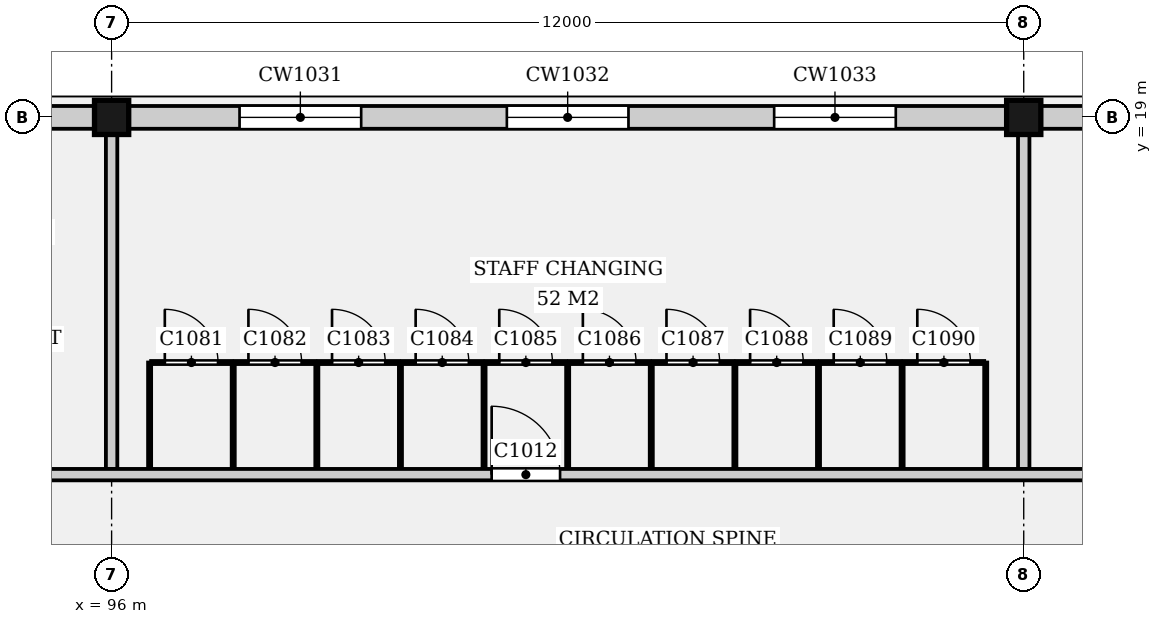
"""IFC4 building model, lengths in metres.
Left out: names, types, materials, properties, quantities, classifications, styles, units other than length and angle.
Written with IfcOpenShell. Run it as: python <this file> out.ifc"""

import sys

from ifc_helpers import new_model, si_unit, direction, frame, frame_2d, origin, origin_2d, place, context, subcontext, project, spatial, rectangle, extrude, element, fill, save


model = new_model("IFC4")
c1 = context("Model", 3, precision=1e-05, world=origin(), true_north=direction((0.0, 1.0)))
c2 = subcontext(c1, "Body", "Model", "MODEL_VIEW")
j1 = project(units=[si_unit("LENGTHUNIT", "METRE"), si_unit("PLANEANGLEUNIT", "RADIAN")], contexts=[c1])
p1 = place(None, origin())
s1 = spatial("IfcSite", under=j1, at=p1, CompositionType="ELEMENT")
p2 = place(p1, origin())
s2 = spatial("IfcBuilding", under=s1, at=p2, CompositionType="ELEMENT")
p3 = place(p2, frame((0.0, 0.0, 5.0)))
s3 = spatial("IfcBuildingStorey", under=s2, at=p3, CompositionType="ELEMENT", Elevation=5.0)
for number, where, z_axis, x_axis in (
    (1, (96.0, 19.0, 0.0), (0.0, 0.0, 1.0), (1.0, 0.0, 0.0)),
    (2, (108.0, 19.0, 0.0), (0.0, 0.0, 1.0), (1.0, 0.0, 0.0)),
):
    element("IfcColumn", number, at=place(p3, frame(where, z_axis=z_axis, x_axis=x_axis)), inside=s3, PredefinedType="COLUMN", context=c2, shape_type="SweptSolid", body=[
        extrude(rectangle(XDim=0.45, YDim=0.45, at=origin_2d()), origin(), (0.0, 0.0, 1.0), 4.4),
    ])
p4 = place(p3, frame((84.225, 19.0, 0.0), z_axis=(0.0, 0.0, 1.0), x_axis=(1.0, 0.0, 0.0)))
e3 = element("IfcWall", 3, at=p4, inside=s3, PredefinedType="ELEMENTEDWALL", context=c2, shape_type="SweptSolid", body=[
    extrude(rectangle(XDim=11.55, YDim=0.3, at=frame_2d((5.775, 0.0))), origin(), (0.0, 0.0, 1.0), 3.98),
])
p5 = place(p4, frame((1.458, 0.0, 1.4)))
e4 = element("IfcOpeningElement", 4, at=p5, cuts=e3, PredefinedType="OPENING", context=c2, shape_type="SweptSolid", body=[
    extrude(rectangle(XDim=1.6, YDim=1.2, at=frame_2d((0.8, 0.6))), frame((0.0, 0.16, 0.0), z_axis=(0.0, -1.0, 0.0), x_axis=(1.0, 0.0, 0.0)), (0.0, 0.0, 1.0), 0.32),
])
p6 = place(p4, frame((4.975, 0.0, 1.4)))
e5 = element("IfcOpeningElement", 5, at=p6, cuts=e3, PredefinedType="OPENING", context=c2, shape_type="SweptSolid", body=[
    extrude(rectangle(XDim=1.6, YDim=1.2, at=frame_2d((0.8, 0.6))), frame((0.0, 0.16, 0.0), z_axis=(0.0, -1.0, 0.0), x_axis=(1.0, 0.0, 0.0)), (0.0, 0.0, 1.0), 0.32),
])
p7 = place(p4, frame((8.492, 0.0, 1.4)))
e6 = element("IfcOpeningElement", 6, at=p7, cuts=e3, PredefinedType="OPENING", context=c2, shape_type="SweptSolid", body=[
    extrude(rectangle(XDim=1.6, YDim=1.2, at=frame_2d((0.8, 0.6))), frame((0.0, 0.16, 0.0), z_axis=(0.0, -1.0, 0.0), x_axis=(1.0, 0.0, 0.0)), (0.0, 0.0, 1.0), 0.32),
])
p8 = place(p3, frame((96.225, 19.0, 0.0), z_axis=(0.0, 0.0, 1.0), x_axis=(1.0, 0.0, 0.0)))
e7 = element("IfcWall", 7, at=p8, inside=s3, PredefinedType="ELEMENTEDWALL", context=c2, shape_type="SweptSolid", body=[
    extrude(rectangle(XDim=11.55, YDim=0.3, at=frame_2d((5.775, 0.0))), origin(), (0.0, 0.0, 1.0), 3.98),
])
p9 = place(p8, frame((1.458, 0.0, 1.4)))
e8 = element("IfcOpeningElement", 8, at=p9, cuts=e7, PredefinedType="OPENING", context=c2, shape_type="SweptSolid", body=[
    extrude(rectangle(XDim=1.6, YDim=1.2, at=frame_2d((0.8, 0.6))), frame((0.0, 0.16, 0.0), z_axis=(0.0, -1.0, 0.0), x_axis=(1.0, 0.0, 0.0)), (0.0, 0.0, 1.0), 0.32),
])
p10 = place(p8, frame((4.975, 0.0, 1.4)))
e9 = element("IfcOpeningElement", 9, at=p10, cuts=e7, PredefinedType="OPENING", context=c2, shape_type="SweptSolid", body=[
    extrude(rectangle(XDim=1.6, YDim=1.2, at=frame_2d((0.8, 0.6))), frame((0.0, 0.16, 0.0), z_axis=(0.0, -1.0, 0.0), x_axis=(1.0, 0.0, 0.0)), (0.0, 0.0, 1.0), 0.32),
])
p11 = place(p8, frame((8.492, 0.0, 1.4)))
e10 = element("IfcOpeningElement", 10, at=p11, cuts=e7, PredefinedType="OPENING", context=c2, shape_type="SweptSolid", body=[
    extrude(rectangle(XDim=1.6, YDim=1.2, at=frame_2d((0.8, 0.6))), frame((0.0, 0.16, 0.0), z_axis=(0.0, -1.0, 0.0), x_axis=(1.0, 0.0, 0.0)), (0.0, 0.0, 1.0), 0.32),
])
p12 = place(p3, frame((108.225, 19.0, 0.0), z_axis=(0.0, 0.0, 1.0), x_axis=(1.0, 0.0, 0.0)))
e11 = element("IfcWall", 11, at=p12, inside=s3, PredefinedType="ELEMENTEDWALL", context=c2, shape_type="SweptSolid", body=[
    extrude(rectangle(XDim=11.55, YDim=0.3, at=frame_2d((5.775, 0.0))), origin(), (0.0, 0.0, 1.0), 3.98),
])
p13 = place(p12, frame((1.458, 0.0, 1.4)))
e12 = element("IfcOpeningElement", 12, at=p13, cuts=e11, PredefinedType="OPENING", context=c2, shape_type="SweptSolid", body=[
    extrude(rectangle(XDim=1.6, YDim=1.2, at=frame_2d((0.8, 0.6))), frame((0.0, 0.16, 0.0), z_axis=(0.0, -1.0, 0.0), x_axis=(1.0, 0.0, 0.0)), (0.0, 0.0, 1.0), 0.32),
])
p14 = place(p12, frame((4.975, 0.0, 1.4)))
e13 = element("IfcOpeningElement", 13, at=p14, cuts=e11, PredefinedType="OPENING", context=c2, shape_type="SweptSolid", body=[
    extrude(rectangle(XDim=1.6, YDim=1.2, at=frame_2d((0.8, 0.6))), frame((0.0, 0.16, 0.0), z_axis=(0.0, -1.0, 0.0), x_axis=(1.0, 0.0, 0.0)), (0.0, 0.0, 1.0), 0.32),
])
p15 = place(p12, frame((8.492, 0.0, 1.4)))
e14 = element("IfcOpeningElement", 14, at=p15, cuts=e11, PredefinedType="OPENING", context=c2, shape_type="SweptSolid", body=[
    extrude(rectangle(XDim=1.6, YDim=1.2, at=frame_2d((0.8, 0.6))), frame((0.0, 0.16, 0.0), z_axis=(0.0, -1.0, 0.0), x_axis=(1.0, 0.0, 0.0)), (0.0, 0.0, 1.0), 0.32),
])
p16 = place(p3, frame((55.3, 14.3, 0.0), z_axis=(0.0, 0.0, 1.0), x_axis=(1.0, 0.0, 0.0)))
e15 = element("IfcWall", 15, at=p16, inside=s3, PredefinedType="PARTITIONING", context=c2, shape_type="SweptSolid", body=[
    extrude(rectangle(XDim=93.4, YDim=0.15, at=frame_2d((46.7, 0.0))), origin(), (0.0, 0.0, 1.0), 3.98),
])
p17 = place(p16, frame((15.8, 0.0, 0.0)))
e16 = element("IfcOpeningElement", 16, at=p17, cuts=e15, PredefinedType="OPENING", context=c2, shape_type="SweptSolid", body=[
    extrude(rectangle(XDim=1.8, YDim=2.4, at=frame_2d((0.9, 1.2))), frame((0.0, 0.085, 0.0), z_axis=(0.0, -1.0, 0.0), x_axis=(1.0, 0.0, 0.0)), (0.0, 0.0, 1.0), 0.17),
])
p18 = place(p16, frame((32.2, 0.0, 0.0)))
e17 = element("IfcOpeningElement", 17, at=p18, cuts=e15, PredefinedType="OPENING", context=c2, shape_type="SweptSolid", body=[
    extrude(rectangle(XDim=1.0, YDim=2.1, at=frame_2d((0.5, 1.05))), frame((0.0, 0.085, 0.0), z_axis=(0.0, -1.0, 0.0), x_axis=(1.0, 0.0, 0.0)), (0.0, 0.0, 1.0), 0.17),
])
p19 = place(p16, frame((38.2, 0.0, 0.0)))
e18 = element("IfcOpeningElement", 18, at=p19, cuts=e15, PredefinedType="OPENING", context=c2, shape_type="SweptSolid", body=[
    extrude(rectangle(XDim=1.0, YDim=2.1, at=frame_2d((0.5, 1.05))), frame((0.0, 0.085, 0.0), z_axis=(0.0, -1.0, 0.0), x_axis=(1.0, 0.0, 0.0)), (0.0, 0.0, 1.0), 0.17),
])
p20 = place(p16, frame((45.7, 0.0, 0.0)))
e19 = element("IfcOpeningElement", 19, at=p20, cuts=e15, PredefinedType="OPENING", context=c2, shape_type="SweptSolid", body=[
    extrude(rectangle(XDim=0.9, YDim=2.1, at=frame_2d((0.45, 1.05))), frame((0.0, 0.085, 0.0), z_axis=(0.0, -1.0, 0.0), x_axis=(1.0, 0.0, 0.0)), (0.0, 0.0, 1.0), 0.17),
])
p21 = place(p16, frame((58.2, 0.0, 0.0)))
e20 = element("IfcOpeningElement", 20, at=p21, cuts=e15, PredefinedType="OPENING", context=c2, shape_type="SweptSolid", body=[
    extrude(rectangle(XDim=1.0, YDim=2.1, at=frame_2d((0.5, 1.05))), frame((0.0, 0.085, 0.0), z_axis=(0.0, -1.0, 0.0), x_axis=(1.0, 0.0, 0.0)), (0.0, 0.0, 1.0), 0.17),
])
p22 = place(p16, frame((70.2, 0.0, 0.0)))
e21 = element("IfcOpeningElement", 21, at=p22, cuts=e15, PredefinedType="OPENING", context=c2, shape_type="SweptSolid", body=[
    extrude(rectangle(XDim=1.0, YDim=2.1, at=frame_2d((0.5, 1.05))), frame((0.0, 0.085, 0.0), z_axis=(0.0, -1.0, 0.0), x_axis=(1.0, 0.0, 0.0)), (0.0, 0.0, 1.0), 0.17),
])
p23 = place(p16, frame((81.68, 0.0, 0.0)))
e22 = element("IfcOpeningElement", 22, at=p23, cuts=e15, PredefinedType="OPENING", context=c2, shape_type="SweptSolid", body=[
    extrude(rectangle(XDim=0.9, YDim=2.1, at=frame_2d((0.45, 1.05))), frame((0.0, 0.085, 0.0), z_axis=(0.0, -1.0, 0.0), x_axis=(1.0, 0.0, 0.0)), (0.0, 0.0, 1.0), 0.17),
])
for number, where, z_axis, x_axis in (
    (23, (96.0, 14.375, 0.0), (0.0, 0.0, 1.0), (0.0, 1.0, 0.0)),
    (24, (108.0, 14.375, 0.0), (0.0, 0.0, 1.0), (0.0, 1.0, 0.0)),
):
    element("IfcWall", number, at=place(p3, frame(where, z_axis=z_axis, x_axis=x_axis)), inside=s3, PredefinedType="PARTITIONING", context=c2, shape_type="SweptSolid", body=[
        extrude(rectangle(XDim=4.4, YDim=0.15, at=frame_2d((2.2, 0.0))), origin(), (0.0, 0.0, 1.0), 3.98),
    ])
for number, where, z_axis, x_axis in (
    (25, (96.5, 14.375, 0.0), (0.0, 0.0, 1.0), (0.0, 1.0, 0.0)),
    (26, (97.6, 14.375, 0.0), (0.0, 0.0, 1.0), (0.0, 1.0, 0.0)),
    (27, (98.7, 14.375, 0.0), (0.0, 0.0, 1.0), (0.0, 1.0, 0.0)),
    (28, (99.8, 14.375, 0.0), (0.0, 0.0, 1.0), (0.0, 1.0, 0.0)),
    (29, (100.9, 14.375, 0.0), (0.0, 0.0, 1.0), (0.0, 1.0, 0.0)),
    (30, (102.0, 14.375, 0.0), (0.0, 0.0, 1.0), (0.0, 1.0, 0.0)),
    (31, (103.1, 14.375, 0.0), (0.0, 0.0, 1.0), (0.0, 1.0, 0.0)),
    (32, (104.2, 14.375, 0.0), (0.0, 0.0, 1.0), (0.0, 1.0, 0.0)),
    (33, (105.3, 14.375, 0.0), (0.0, 0.0, 1.0), (0.0, 1.0, 0.0)),
    (34, (106.4, 14.375, 0.0), (0.0, 0.0, 1.0), (0.0, 1.0, 0.0)),
    (35, (107.5, 14.375, 0.0), (0.0, 0.0, 1.0), (0.0, 1.0, 0.0)),
):
    element("IfcWall", number, at=place(p3, frame(where, z_axis=z_axis, x_axis=x_axis)), inside=s3, PredefinedType="PARTITIONING", context=c2, shape_type="SweptSolid", body=[
        extrude(rectangle(XDim=1.4, YDim=0.04, at=frame_2d((0.7, 0.0))), origin(), (0.0, 0.0, 1.0), 2.4),
    ])
p24 = place(p3, frame((96.52, 15.775, 0.0), z_axis=(0.0, 0.0, 1.0), x_axis=(1.0, 0.0, 0.0)))
e36 = element("IfcWall", 36, at=p24, inside=s3, PredefinedType="PARTITIONING", context=c2, shape_type="SweptSolid", body=[
    extrude(rectangle(XDim=1.06, YDim=0.04, at=frame_2d((0.53, 0.0))), origin(), (0.0, 0.0, 1.0), 2.4),
])
p25 = place(p24, frame((0.18, 0.0, 0.0)))
e37 = element("IfcOpeningElement", 37, at=p25, cuts=e36, PredefinedType="OPENING", context=c2, shape_type="SweptSolid", body=[
    extrude(rectangle(XDim=0.7, YDim=2.0, at=frame_2d((0.35, 1.0))), frame((0.0, 0.03, 0.0), z_axis=(0.0, -1.0, 0.0), x_axis=(1.0, 0.0, 0.0)), (0.0, 0.0, 1.0), 0.06),
])
p26 = place(p3, frame((97.62, 15.775, 0.0), z_axis=(0.0, 0.0, 1.0), x_axis=(1.0, 0.0, 0.0)))
e38 = element("IfcWall", 38, at=p26, inside=s3, PredefinedType="PARTITIONING", context=c2, shape_type="SweptSolid", body=[
    extrude(rectangle(XDim=1.06, YDim=0.04, at=frame_2d((0.53, 0.0))), origin(), (0.0, 0.0, 1.0), 2.4),
])
p27 = place(p26, frame((0.18, 0.0, 0.0)))
e39 = element("IfcOpeningElement", 39, at=p27, cuts=e38, PredefinedType="OPENING", context=c2, shape_type="SweptSolid", body=[
    extrude(rectangle(XDim=0.7, YDim=2.0, at=frame_2d((0.35, 1.0))), frame((0.0, 0.03, 0.0), z_axis=(0.0, -1.0, 0.0), x_axis=(1.0, 0.0, 0.0)), (0.0, 0.0, 1.0), 0.06),
])
p28 = place(p3, frame((98.72, 15.775, 0.0), z_axis=(0.0, 0.0, 1.0), x_axis=(1.0, 0.0, 0.0)))
e40 = element("IfcWall", 40, at=p28, inside=s3, PredefinedType="PARTITIONING", context=c2, shape_type="SweptSolid", body=[
    extrude(rectangle(XDim=1.06, YDim=0.04, at=frame_2d((0.53, 0.0))), origin(), (0.0, 0.0, 1.0), 2.4),
])
p29 = place(p28, frame((0.18, 0.0, 0.0)))
e41 = element("IfcOpeningElement", 41, at=p29, cuts=e40, PredefinedType="OPENING", context=c2, shape_type="SweptSolid", body=[
    extrude(rectangle(XDim=0.7, YDim=2.0, at=frame_2d((0.35, 1.0))), frame((0.0, 0.03, 0.0), z_axis=(0.0, -1.0, 0.0), x_axis=(1.0, 0.0, 0.0)), (0.0, 0.0, 1.0), 0.06),
])
p30 = place(p3, frame((99.82, 15.775, 0.0), z_axis=(0.0, 0.0, 1.0), x_axis=(1.0, 0.0, 0.0)))
e42 = element("IfcWall", 42, at=p30, inside=s3, PredefinedType="PARTITIONING", context=c2, shape_type="SweptSolid", body=[
    extrude(rectangle(XDim=1.06, YDim=0.04, at=frame_2d((0.53, 0.0))), origin(), (0.0, 0.0, 1.0), 2.4),
])
p31 = place(p30, frame((0.18, 0.0, 0.0)))
e43 = element("IfcOpeningElement", 43, at=p31, cuts=e42, PredefinedType="OPENING", context=c2, shape_type="SweptSolid", body=[
    extrude(rectangle(XDim=0.7, YDim=2.0, at=frame_2d((0.35, 1.0))), frame((0.0, 0.03, 0.0), z_axis=(0.0, -1.0, 0.0), x_axis=(1.0, 0.0, 0.0)), (0.0, 0.0, 1.0), 0.06),
])
p32 = place(p3, frame((100.92, 15.775, 0.0), z_axis=(0.0, 0.0, 1.0), x_axis=(1.0, 0.0, 0.0)))
e44 = element("IfcWall", 44, at=p32, inside=s3, PredefinedType="PARTITIONING", context=c2, shape_type="SweptSolid", body=[
    extrude(rectangle(XDim=1.06, YDim=0.04, at=frame_2d((0.53, 0.0))), origin(), (0.0, 0.0, 1.0), 2.4),
])
p33 = place(p32, frame((0.18, 0.0, 0.0)))
e45 = element("IfcOpeningElement", 45, at=p33, cuts=e44, PredefinedType="OPENING", context=c2, shape_type="SweptSolid", body=[
    extrude(rectangle(XDim=0.7, YDim=2.0, at=frame_2d((0.35, 1.0))), frame((0.0, 0.03, 0.0), z_axis=(0.0, -1.0, 0.0), x_axis=(1.0, 0.0, 0.0)), (0.0, 0.0, 1.0), 0.06),
])
p34 = place(p3, frame((102.02, 15.775, 0.0), z_axis=(0.0, 0.0, 1.0), x_axis=(1.0, 0.0, 0.0)))
e46 = element("IfcWall", 46, at=p34, inside=s3, PredefinedType="PARTITIONING", context=c2, shape_type="SweptSolid", body=[
    extrude(rectangle(XDim=1.06, YDim=0.04, at=frame_2d((0.53, 0.0))), origin(), (0.0, 0.0, 1.0), 2.4),
])
p35 = place(p34, frame((0.18, 0.0, 0.0)))
e47 = element("IfcOpeningElement", 47, at=p35, cuts=e46, PredefinedType="OPENING", context=c2, shape_type="SweptSolid", body=[
    extrude(rectangle(XDim=0.7, YDim=2.0, at=frame_2d((0.35, 1.0))), frame((0.0, 0.03, 0.0), z_axis=(0.0, -1.0, 0.0), x_axis=(1.0, 0.0, 0.0)), (0.0, 0.0, 1.0), 0.06),
])
p36 = place(p3, frame((103.12, 15.775, 0.0), z_axis=(0.0, 0.0, 1.0), x_axis=(1.0, 0.0, 0.0)))
e48 = element("IfcWall", 48, at=p36, inside=s3, PredefinedType="PARTITIONING", context=c2, shape_type="SweptSolid", body=[
    extrude(rectangle(XDim=1.06, YDim=0.04, at=frame_2d((0.53, 0.0))), origin(), (0.0, 0.0, 1.0), 2.4),
])
p37 = place(p36, frame((0.18, 0.0, 0.0)))
e49 = element("IfcOpeningElement", 49, at=p37, cuts=e48, PredefinedType="OPENING", context=c2, shape_type="SweptSolid", body=[
    extrude(rectangle(XDim=0.7, YDim=2.0, at=frame_2d((0.35, 1.0))), frame((0.0, 0.03, 0.0), z_axis=(0.0, -1.0, 0.0), x_axis=(1.0, 0.0, 0.0)), (0.0, 0.0, 1.0), 0.06),
])
p38 = place(p3, frame((104.22, 15.775, 0.0), z_axis=(0.0, 0.0, 1.0), x_axis=(1.0, 0.0, 0.0)))
e50 = element("IfcWall", 50, at=p38, inside=s3, PredefinedType="PARTITIONING", context=c2, shape_type="SweptSolid", body=[
    extrude(rectangle(XDim=1.06, YDim=0.04, at=frame_2d((0.53, 0.0))), origin(), (0.0, 0.0, 1.0), 2.4),
])
p39 = place(p38, frame((0.18, 0.0, 0.0)))
e51 = element("IfcOpeningElement", 51, at=p39, cuts=e50, PredefinedType="OPENING", context=c2, shape_type="SweptSolid", body=[
    extrude(rectangle(XDim=0.7, YDim=2.0, at=frame_2d((0.35, 1.0))), frame((0.0, 0.03, 0.0), z_axis=(0.0, -1.0, 0.0), x_axis=(1.0, 0.0, 0.0)), (0.0, 0.0, 1.0), 0.06),
])
p40 = place(p3, frame((105.32, 15.775, 0.0), z_axis=(0.0, 0.0, 1.0), x_axis=(1.0, 0.0, 0.0)))
e52 = element("IfcWall", 52, at=p40, inside=s3, PredefinedType="PARTITIONING", context=c2, shape_type="SweptSolid", body=[
    extrude(rectangle(XDim=1.06, YDim=0.04, at=frame_2d((0.53, 0.0))), origin(), (0.0, 0.0, 1.0), 2.4),
])
p41 = place(p40, frame((0.18, 0.0, 0.0)))
e53 = element("IfcOpeningElement", 53, at=p41, cuts=e52, PredefinedType="OPENING", context=c2, shape_type="SweptSolid", body=[
    extrude(rectangle(XDim=0.7, YDim=2.0, at=frame_2d((0.35, 1.0))), frame((0.0, 0.03, 0.0), z_axis=(0.0, -1.0, 0.0), x_axis=(1.0, 0.0, 0.0)), (0.0, 0.0, 1.0), 0.06),
])
p42 = place(p3, frame((106.42, 15.775, 0.0), z_axis=(0.0, 0.0, 1.0), x_axis=(1.0, 0.0, 0.0)))
e54 = element("IfcWall", 54, at=p42, inside=s3, PredefinedType="PARTITIONING", context=c2, shape_type="SweptSolid", body=[
    extrude(rectangle(XDim=1.06, YDim=0.04, at=frame_2d((0.53, 0.0))), origin(), (0.0, 0.0, 1.0), 2.4),
])
p43 = place(p42, frame((0.18, 0.0, 0.0)))
e55 = element("IfcOpeningElement", 55, at=p43, cuts=e54, PredefinedType="OPENING", context=c2, shape_type="SweptSolid", body=[
    extrude(rectangle(XDim=0.7, YDim=2.0, at=frame_2d((0.35, 1.0))), frame((0.0, 0.03, 0.0), z_axis=(0.0, -1.0, 0.0), x_axis=(1.0, 0.0, 0.0)), (0.0, 0.0, 1.0), 0.06),
])
p44 = place(p9, origin())
e56 = element("IfcWindow", 56, at=p44, inside=s3, PartitioningType="SINGLE_PANEL", PredefinedType="WINDOW", context=c2, shape_type="SweptSolid", body=[
    extrude(rectangle(XDim=1.6, YDim=1.2, at=frame_2d((0.8, 0.6))), frame((0.0, 0.03, 0.0), z_axis=(0.0, -1.0, 0.0), x_axis=(1.0, 0.0, 0.0)), (0.0, 0.0, 1.0), 0.06),
])
fill(e8, e56)
p45 = place(p10, origin())
e57 = element("IfcWindow", 57, at=p45, inside=s3, PartitioningType="SINGLE_PANEL", PredefinedType="WINDOW", context=c2, shape_type="SweptSolid", body=[
    extrude(rectangle(XDim=1.6, YDim=1.2, at=frame_2d((0.8, 0.6))), frame((0.0, 0.03, 0.0), z_axis=(0.0, -1.0, 0.0), x_axis=(1.0, 0.0, 0.0)), (0.0, 0.0, 1.0), 0.06),
])
fill(e9, e57)
p46 = place(p11, origin())
e58 = element("IfcWindow", 58, at=p46, inside=s3, PartitioningType="SINGLE_PANEL", PredefinedType="WINDOW", context=c2, shape_type="SweptSolid", body=[
    extrude(rectangle(XDim=1.6, YDim=1.2, at=frame_2d((0.8, 0.6))), frame((0.0, 0.03, 0.0), z_axis=(0.0, -1.0, 0.0), x_axis=(1.0, 0.0, 0.0)), (0.0, 0.0, 1.0), 0.06),
])
fill(e10, e58)
p47 = place(p20, origin())
e59 = element("IfcDoor", 59, at=p47, inside=s3, OperationType="SINGLE_SWING_LEFT", PredefinedType="DOOR", context=c2, shape_type="SweptSolid", body=[
    extrude(rectangle(XDim=0.9, YDim=2.1, at=frame_2d((0.45, 1.05))), frame((0.0, 0.025, 0.0), z_axis=(0.0, -1.0, 0.0), x_axis=(1.0, 0.0, 0.0)), (0.0, 0.0, 1.0), 0.05),
])
fill(e19, e59)
p48 = place(p25, origin())
e60 = element("IfcDoor", 60, at=p48, inside=s3, OperationType="SINGLE_SWING_LEFT", PredefinedType="DOOR", context=c2, shape_type="SweptSolid", body=[
    extrude(rectangle(XDim=0.7, YDim=2.0, at=frame_2d((0.35, 1.0))), frame((0.0, 0.02, 0.0), z_axis=(0.0, -1.0, 0.0), x_axis=(1.0, 0.0, 0.0)), (0.0, 0.0, 1.0), 0.04),
])
fill(e37, e60)
p49 = place(p27, origin())
e61 = element("IfcDoor", 61, at=p49, inside=s3, OperationType="SINGLE_SWING_LEFT", PredefinedType="DOOR", context=c2, shape_type="SweptSolid", body=[
    extrude(rectangle(XDim=0.7, YDim=2.0, at=frame_2d((0.35, 1.0))), frame((0.0, 0.02, 0.0), z_axis=(0.0, -1.0, 0.0), x_axis=(1.0, 0.0, 0.0)), (0.0, 0.0, 1.0), 0.04),
])
fill(e39, e61)
p50 = place(p29, origin())
e62 = element("IfcDoor", 62, at=p50, inside=s3, OperationType="SINGLE_SWING_LEFT", PredefinedType="DOOR", context=c2, shape_type="SweptSolid", body=[
    extrude(rectangle(XDim=0.7, YDim=2.0, at=frame_2d((0.35, 1.0))), frame((0.0, 0.02, 0.0), z_axis=(0.0, -1.0, 0.0), x_axis=(1.0, 0.0, 0.0)), (0.0, 0.0, 1.0), 0.04),
])
fill(e41, e62)
p51 = place(p31, origin())
e63 = element("IfcDoor", 63, at=p51, inside=s3, OperationType="SINGLE_SWING_LEFT", PredefinedType="DOOR", context=c2, shape_type="SweptSolid", body=[
    extrude(rectangle(XDim=0.7, YDim=2.0, at=frame_2d((0.35, 1.0))), frame((0.0, 0.02, 0.0), z_axis=(0.0, -1.0, 0.0), x_axis=(1.0, 0.0, 0.0)), (0.0, 0.0, 1.0), 0.04),
])
fill(e43, e63)
p52 = place(p33, origin())
e64 = element("IfcDoor", 64, at=p52, inside=s3, OperationType="SINGLE_SWING_LEFT", PredefinedType="DOOR", context=c2, shape_type="SweptSolid", body=[
    extrude(rectangle(XDim=0.7, YDim=2.0, at=frame_2d((0.35, 1.0))), frame((0.0, 0.02, 0.0), z_axis=(0.0, -1.0, 0.0), x_axis=(1.0, 0.0, 0.0)), (0.0, 0.0, 1.0), 0.04),
])
fill(e45, e64)
p53 = place(p35, origin())
e65 = element("IfcDoor", 65, at=p53, inside=s3, OperationType="SINGLE_SWING_LEFT", PredefinedType="DOOR", context=c2, shape_type="SweptSolid", body=[
    extrude(rectangle(XDim=0.7, YDim=2.0, at=frame_2d((0.35, 1.0))), frame((0.0, 0.02, 0.0), z_axis=(0.0, -1.0, 0.0), x_axis=(1.0, 0.0, 0.0)), (0.0, 0.0, 1.0), 0.04),
])
fill(e47, e65)
p54 = place(p37, origin())
e66 = element("IfcDoor", 66, at=p54, inside=s3, OperationType="SINGLE_SWING_LEFT", PredefinedType="DOOR", context=c2, shape_type="SweptSolid", body=[
    extrude(rectangle(XDim=0.7, YDim=2.0, at=frame_2d((0.35, 1.0))), frame((0.0, 0.02, 0.0), z_axis=(0.0, -1.0, 0.0), x_axis=(1.0, 0.0, 0.0)), (0.0, 0.0, 1.0), 0.04),
])
fill(e49, e66)
p55 = place(p39, origin())
e67 = element("IfcDoor", 67, at=p55, inside=s3, OperationType="SINGLE_SWING_LEFT", PredefinedType="DOOR", context=c2, shape_type="SweptSolid", body=[
    extrude(rectangle(XDim=0.7, YDim=2.0, at=frame_2d((0.35, 1.0))), frame((0.0, 0.02, 0.0), z_axis=(0.0, -1.0, 0.0), x_axis=(1.0, 0.0, 0.0)), (0.0, 0.0, 1.0), 0.04),
])
fill(e51, e67)
p56 = place(p41, origin())
e68 = element("IfcDoor", 68, at=p56, inside=s3, OperationType="SINGLE_SWING_LEFT", PredefinedType="DOOR", context=c2, shape_type="SweptSolid", body=[
    extrude(rectangle(XDim=0.7, YDim=2.0, at=frame_2d((0.35, 1.0))), frame((0.0, 0.02, 0.0), z_axis=(0.0, -1.0, 0.0), x_axis=(1.0, 0.0, 0.0)), (0.0, 0.0, 1.0), 0.04),
])
fill(e53, e68)
p57 = place(p43, origin())
e69 = element("IfcDoor", 69, at=p57, inside=s3, OperationType="SINGLE_SWING_LEFT", PredefinedType="DOOR", context=c2, shape_type="SweptSolid", body=[
    extrude(rectangle(XDim=0.7, YDim=2.0, at=frame_2d((0.35, 1.0))), frame((0.0, 0.02, 0.0), z_axis=(0.0, -1.0, 0.0), x_axis=(1.0, 0.0, 0.0)), (0.0, 0.0, 1.0), 0.04),
])
fill(e55, e69)
save(model, sys.argv[1])
